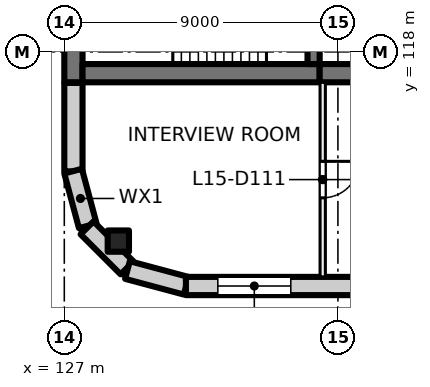
"""IFC4 building model, lengths in metres.
Left out: names, types, materials, properties, quantities, classifications, styles, units other than length and angle.
Written with IfcOpenShell. Run it as: python <this file> out.ifc"""

import sys

from ifc_helpers import new_model, si_unit, direction, frame, frame_2d, origin, origin_2d, place, context, subcontext, project, spatial, rectangle, extrude, element, fill, save


model = new_model("IFC4")
c1 = context("Model", 3, precision=1e-05, world=origin(), true_north=direction((0.0, 1.0)))
c2 = subcontext(c1, "Body", "Model", "MODEL_VIEW")
j1 = project(units=[si_unit("LENGTHUNIT", "METRE"), si_unit("PLANEANGLEUNIT", "RADIAN")], contexts=[c1])
p1 = place(None, origin())
s1 = spatial("IfcSite", under=j1, at=p1, CompositionType="ELEMENT")
p2 = place(p1, origin())
s2 = spatial("IfcBuilding", under=s1, at=p2, CompositionType="ELEMENT")
p3 = place(p2, frame((0.0, 0.0, 67.5)))
s3 = spatial("IfcBuildingStorey", under=s2, at=p3, CompositionType="ELEMENT", Elevation=67.5)
p4 = place(p3, frame((128.777, 111.777, 0.0), z_axis=(0.0, 0.0, 1.0), x_axis=(1.0, 0.0, 0.0)))
e1 = element("IfcColumn", 1, at=p4, inside=s3, PredefinedType="COLUMN", context=c2, shape_type="SweptSolid", body=[
    extrude(rectangle(XDim=0.7, YDim=0.7, at=origin_2d()), origin(), (0.0, 0.0, 1.0), 4.0),
])
p5 = place(p3, frame((127.3, 117.0, 0.0), z_axis=(0.0, 0.0, 1.0), x_axis=(0.0, 1.0, 0.0)))
e2 = element("IfcWall", 2, at=p5, inside=s3, PredefinedType="SHEAR", context=c2, shape_type="SweptSolid", body=[
    extrude(rectangle(XDim=3.8, YDim=0.6, at=frame_2d((1.9, 0.0))), origin(), (0.0, 0.0, 1.0), 4.0),
])
p6 = place(p3, frame((127.6, 117.3, 0.0), z_axis=(0.0, 0.0, 1.0), x_axis=(1.0, 0.0, 0.0)))
e3 = element("IfcWall", 3, at=p6, inside=s3, PredefinedType="SHEAR", context=c2, shape_type="SweptSolid", body=[
    extrude(rectangle(XDim=7.8, YDim=0.6, at=frame_2d((3.9, 0.0))), origin(), (0.0, 0.0, 1.0), 4.0),
])
p7 = place(p3, frame((135.4, 117.3, 0.0), z_axis=(0.0, 0.0, 1.0), x_axis=(1.0, 0.0, 0.0)))
e4 = element("IfcWall", 4, at=p7, inside=s3, PredefinedType="SHEAR", context=c2, shape_type="SweptSolid", body=[
    extrude(rectangle(XDim=4.6, YDim=0.6, at=frame_2d((2.3, 0.0))), origin(), (0.0, 0.0, 1.0), 4.0),
])
p8 = place(p3, frame((135.2, 117.6, 0.0), z_axis=(0.0, 0.0, 1.0), x_axis=(0.0, 1.0, 0.0)))
e5 = element("IfcWall", 5, at=p8, inside=s3, PredefinedType="SHEAR", context=c2, shape_type="SweptSolid", body=[
    extrude(rectangle(XDim=2.8, YDim=0.4, at=frame_2d((1.4, 0.0))), origin(), (0.0, 0.0, 1.0), 4.0),
])
p9 = place(p8, frame((0.9, 0.0, 0.0)))
e6 = element("IfcOpeningElement", 6, at=p9, cuts=e5, PredefinedType="OPENING", context=c2, shape_type="SweptSolid", body=[
    extrude(rectangle(XDim=1.0, YDim=2.1, at=frame_2d((0.5, 1.05))), frame((0.0, 0.21, 0.0), z_axis=(0.0, -1.0, 0.0), x_axis=(1.0, 0.0, 0.0)), (0.0, 0.0, 1.0), 0.42),
])
p10 = place(p3, frame((127.3, 114.07, 0.0), z_axis=(0.0, 0.0, 1.0), x_axis=(0.0, 1.0, 0.0)))
e7 = element("IfcWall", 7, at=p10, inside=s3, PredefinedType="SOLIDWALL", context=c2, shape_type="SweptSolid", body=[
    extrude(rectangle(XDim=2.91, YDim=0.6, at=frame_2d((1.455, 0.0))), origin(), (0.0, 0.0, 1.0), 3.625),
])
for number, where, z_axis, x_axis in (
    (8, (127.771, 112.281, 0.0), (0.0, 0.0, 1.0), (-0.259, 0.966, 0.0)),
    (9, (129.064, 110.896, 0.0), (0.0, 0.0, 1.0), (-0.707, 0.707, 0.0)),
):
    element("IfcWall", number, at=place(p3, frame(where, z_axis=z_axis, x_axis=x_axis)), inside=s3, PredefinedType="SOLIDWALL", context=c2, shape_type="SweptSolid", body=[
        extrude(rectangle(XDim=1.861, YDim=0.6, at=frame_2d((0.93, 0.0))), origin(), (0.0, 0.0, 1.0), 3.625),
    ])
p11 = place(p3, frame((131.01, 110.308, 0.0), z_axis=(0.0, 0.0, 1.0), x_axis=(-0.965920269068, 0.258839784042, 0.0)))
e10 = element("IfcWall", 10, at=p11, inside=s3, PredefinedType="SOLIDWALL", context=c2, shape_type="SweptSolid", body=[
    extrude(rectangle(XDim=2.0, YDim=0.6, at=frame_2d((1.0, 0.0))), origin(), (0.0, 0.0, 1.0), 3.625),
])
p12 = place(p3, frame((162.93, 110.3, 0.0), z_axis=(0.0, 0.0, 1.0), x_axis=(-1.0, 0.0, 0.0)))
e11 = element("IfcWall", 11, at=p12, inside=s3, PredefinedType="SOLIDWALL", context=c2, shape_type="SweptSolid", body=[
    extrude(rectangle(XDim=31.93, YDim=0.6, at=frame_2d((15.965, 0.0))), origin(), (0.0, 0.0, 1.0), 3.625),
])
p13 = place(p12, frame((1.48, 0.0, 0.9)))
e12 = element("IfcOpeningElement", 12, at=p13, cuts=e11, PredefinedType="OPENING", context=c2, shape_type="SweptSolid", body=[
    extrude(rectangle(XDim=2.4, YDim=2.4, at=frame_2d((1.2, 1.2))), frame((0.0, 0.31, 0.0), z_axis=(0.0, -1.0, 0.0), x_axis=(1.0, 0.0, 0.0)), (0.0, 0.0, 1.0), 0.62),
])
p14 = place(p12, frame((5.98, 0.0, 0.9)))
e13 = element("IfcOpeningElement", 13, at=p14, cuts=e11, PredefinedType="OPENING", context=c2, shape_type="SweptSolid", body=[
    extrude(rectangle(XDim=2.4, YDim=2.4, at=frame_2d((1.2, 1.2))), frame((0.0, 0.31, 0.0), z_axis=(0.0, -1.0, 0.0), x_axis=(1.0, 0.0, 0.0)), (0.0, 0.0, 1.0), 0.62),
])
p15 = place(p12, frame((10.48, 0.0, 0.9)))
e14 = element("IfcOpeningElement", 14, at=p15, cuts=e11, PredefinedType="OPENING", context=c2, shape_type="SweptSolid", body=[
    extrude(rectangle(XDim=2.4, YDim=2.4, at=frame_2d((1.2, 1.2))), frame((0.0, 0.31, 0.0), z_axis=(0.0, -1.0, 0.0), x_axis=(1.0, 0.0, 0.0)), (0.0, 0.0, 1.0), 0.62),
])
p16 = place(p12, frame((14.98, 0.0, 0.9)))
e15 = element("IfcOpeningElement", 15, at=p16, cuts=e11, PredefinedType="OPENING", context=c2, shape_type="SweptSolid", body=[
    extrude(rectangle(XDim=2.4, YDim=2.4, at=frame_2d((1.2, 1.2))), frame((0.0, 0.31, 0.0), z_axis=(0.0, -1.0, 0.0), x_axis=(1.0, 0.0, 0.0)), (0.0, 0.0, 1.0), 0.62),
])
p17 = place(p12, frame((19.48, 0.0, 0.9)))
e16 = element("IfcOpeningElement", 16, at=p17, cuts=e11, PredefinedType="OPENING", context=c2, shape_type="SweptSolid", body=[
    extrude(rectangle(XDim=2.4, YDim=2.4, at=frame_2d((1.2, 1.2))), frame((0.0, 0.31, 0.0), z_axis=(0.0, -1.0, 0.0), x_axis=(1.0, 0.0, 0.0)), (0.0, 0.0, 1.0), 0.62),
])
p18 = place(p12, frame((23.98, 0.0, 0.9)))
e17 = element("IfcOpeningElement", 17, at=p18, cuts=e11, PredefinedType="OPENING", context=c2, shape_type="SweptSolid", body=[
    extrude(rectangle(XDim=2.4, YDim=2.4, at=frame_2d((1.2, 1.2))), frame((0.0, 0.31, 0.0), z_axis=(0.0, -1.0, 0.0), x_axis=(1.0, 0.0, 0.0)), (0.0, 0.0, 1.0), 0.62),
])
p19 = place(p12, frame((28.48, 0.0, 0.9)))
e18 = element("IfcOpeningElement", 18, at=p19, cuts=e11, PredefinedType="OPENING", context=c2, shape_type="SweptSolid", body=[
    extrude(rectangle(XDim=2.4, YDim=2.4, at=frame_2d((1.2, 1.2))), frame((0.0, 0.31, 0.0), z_axis=(0.0, -1.0, 0.0), x_axis=(1.0, 0.0, 0.0)), (0.0, 0.0, 1.0), 0.62),
])
p20 = place(p3, frame((135.5, 117.0, 0.0), z_axis=(0.0, 0.0, 1.0), x_axis=(0.0, -1.0, 0.0)))
e19 = element("IfcWall", 19, at=p20, inside=s3, PredefinedType="PARTITIONING", context=c2, shape_type="SweptSolid", body=[
    extrude(rectangle(XDim=6.4, YDim=0.175, at=frame_2d((3.2, 0.0))), origin(), (0.0, 0.0, 1.0), 3.625),
])
p21 = place(p20, frame((2.6, 0.0, 0.0)))
e20 = element("IfcOpeningElement", 20, at=p21, cuts=e19, PredefinedType="OPENING", context=c2, shape_type="SweptSolid", body=[
    extrude(rectangle(XDim=1.2, YDim=2.1, at=frame_2d((0.6, 1.05))), frame((0.0, 0.097, 0.0), z_axis=(0.0, -1.0, 0.0), x_axis=(1.0, 0.0, 0.0)), (0.0, 0.0, 1.0), 0.195),
])
p22 = place(p19, origin())
e21 = element("IfcWindow", 21, at=p22, inside=s3, PartitioningType="SINGLE_PANEL", PredefinedType="WINDOW", context=c2, shape_type="SweptSolid", body=[
    extrude(rectangle(XDim=2.4, YDim=2.4, at=frame_2d((1.2, 1.2))), frame((0.0, 0.03, 0.0), z_axis=(0.0, -1.0, 0.0), x_axis=(1.0, 0.0, 0.0)), (0.0, 0.0, 1.0), 0.06),
])
fill(e18, e21)
p23 = place(p21, origin())
e22 = element("IfcDoor", 22, at=p23, inside=s3, OperationType="DOUBLE_DOOR_SINGLE_SWING", PredefinedType="DOOR", context=c2, shape_type="SweptSolid", body=[
    extrude(rectangle(XDim=1.2, YDim=2.1, at=frame_2d((0.6, 1.05))), frame((0.0, 0.025, 0.0), z_axis=(0.0, -1.0, 0.0), x_axis=(1.0, 0.0, 0.0)), (0.0, 0.0, 1.0), 0.05),
])
fill(e20, e22)
save(model, sys.argv[1])
